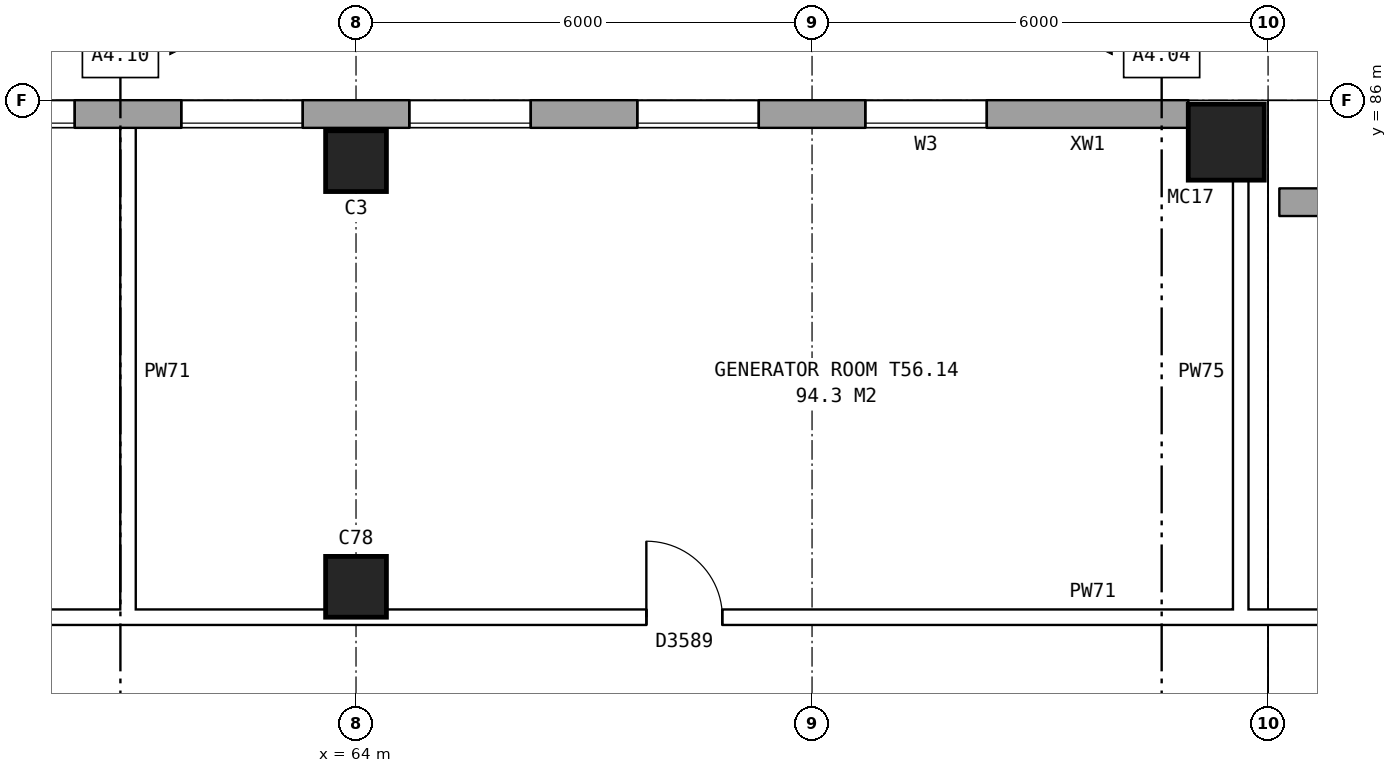
"""IFC4 building model, lengths in metres.
Left out: names, types, materials, properties, quantities, classifications, styles, units other than length and angle.
Written with IfcOpenShell. Run it as: python <this file> out.ifc"""

import sys

from ifc_helpers import new_model, si_unit, direction, frame, frame_2d, origin, origin_2d, place, context, subcontext, project, spatial, rectangle, hollow_rectangle, extrude, element, fill, save


model = new_model("IFC4")
c1 = context("Model", 3, precision=1e-05, world=origin(), true_north=direction((0.0, 1.0)))
c2 = subcontext(c1, "Body", "Model", "MODEL_VIEW")
j1 = project(units=[si_unit("LENGTHUNIT", "METRE"), si_unit("PLANEANGLEUNIT", "RADIAN")], contexts=[c1])
p1 = place(None, origin())
s1 = spatial("IfcSite", under=j1, at=p1, CompositionType="ELEMENT")
p2 = place(p1, origin())
s2 = spatial("IfcBuilding", under=s1, at=p2, CompositionType="ELEMENT")
p3 = place(p2, frame((0.0, 0.0, 198.6)))
s3 = spatial("IfcBuildingStorey", under=s2, at=p3, CompositionType="ELEMENT", Elevation=198.6)
for number, where, z_axis, x_axis in (
    (1, (64.0, 79.6, 0.0), (0.0, 0.0, 1.0), (1.0, 0.0, 0.0)),
    (2, (64.0, 85.2, 0.0), (0.0, 0.0, 1.0), (1.0, 0.0, 0.0)),
):
    element("IfcColumn", number, at=place(p3, frame(where, z_axis=z_axis, x_axis=x_axis)), inside=s3, PredefinedType="COLUMN", context=c2, shape_type="SweptSolid", body=[
        extrude(rectangle(XDim=0.8, YDim=0.8, at=origin_2d()), origin(), (0.0, 0.0, 1.0), 3.7),
    ])
p4 = place(p3, frame((75.45, 85.45, 0.0), z_axis=(0.0, 0.0, 1.0), x_axis=(1.0, 0.0, 0.0)))
e3 = element("IfcColumn", 3, at=p4, inside=s3, PredefinedType="COLUMN", context=c2, shape_type="SweptSolid", body=[
    extrude(hollow_rectangle(XDim=1.0, YDim=1.0, WallThickness=0.055, at=origin_2d()), origin(), (0.0, 0.0, 1.0), 4.2),
])
p5 = place(p3, frame((130.85, 84.66, 0.0), z_axis=(0.0, 0.0, 1.0), x_axis=(-1.0, 0.0, 0.0)))
e4 = element("IfcWall", 4, at=p5, inside=s3, PredefinedType="STANDARD", context=c2, shape_type="SweptSolid", body=[
    extrude(rectangle(XDim=54.7, YDim=0.36, at=frame_2d((27.35, 0.0))), origin(), (0.0, 0.0, 1.0), 3.7),
])
p6 = place(p5, frame((1.75, 0.0, 1.5)))
e5 = element("IfcOpeningElement", 5, at=p6, cuts=e4, PredefinedType="OPENING", context=c2, shape_type="SweptSolid", body=[
    extrude(rectangle(XDim=0.6, YDim=1.2, at=frame_2d((0.3, 0.6))), frame((0.0, 0.19, 0.0), z_axis=(0.0, -1.0, 0.0), x_axis=(1.0, 0.0, 0.0)), (0.0, 0.0, 1.0), 0.38),
])
p7 = place(p5, frame((4.206, 0.0, 1.5)))
e6 = element("IfcOpeningElement", 6, at=p7, cuts=e4, PredefinedType="OPENING", context=c2, shape_type="SweptSolid", body=[
    extrude(rectangle(XDim=1.6, YDim=1.2, at=frame_2d((0.8, 0.6))), frame((0.0, 0.19, 0.0), z_axis=(0.0, -1.0, 0.0), x_axis=(1.0, 0.0, 0.0)), (0.0, 0.0, 1.0), 0.38),
])
p8 = place(p5, frame((2.65, 0.0, 1.5)))
e7 = element("IfcOpeningElement", 7, at=p8, cuts=e4, PredefinedType="OPENING", context=c2, shape_type="SweptSolid", body=[
    extrude(rectangle(XDim=1.2, YDim=1.2, at=frame_2d((0.6, 0.6))), frame((0.0, 0.19, 0.0), z_axis=(0.0, -1.0, 0.0), x_axis=(1.0, 0.0, 0.0)), (0.0, 0.0, 1.0), 0.38),
])
p9 = place(p5, frame((11.081, 0.0, 1.5)))
e8 = element("IfcOpeningElement", 8, at=p9, cuts=e4, PredefinedType="OPENING", context=c2, shape_type="SweptSolid", body=[
    extrude(rectangle(XDim=1.6, YDim=1.2, at=frame_2d((0.8, 0.6))), frame((0.0, 0.19, 0.0), z_axis=(0.0, -1.0, 0.0), x_axis=(1.0, 0.0, 0.0)), (0.0, 0.0, 1.0), 0.38),
])
p10 = place(p5, frame((15.5, 0.0, 1.5)))
e9 = element("IfcOpeningElement", 9, at=p10, cuts=e4, PredefinedType="OPENING", context=c2, shape_type="SweptSolid", body=[
    extrude(rectangle(XDim=1.6, YDim=1.2, at=frame_2d((0.8, 0.6))), frame((0.0, 0.19, 0.0), z_axis=(0.0, -1.0, 0.0), x_axis=(1.0, 0.0, 0.0)), (0.0, 0.0, 1.0), 0.38),
])
p11 = place(p5, frame((17.956, 0.0, 1.5)))
e10 = element("IfcOpeningElement", 10, at=p11, cuts=e4, PredefinedType="OPENING", context=c2, shape_type="SweptSolid", body=[
    extrude(rectangle(XDim=1.6, YDim=1.2, at=frame_2d((0.8, 0.6))), frame((0.0, 0.19, 0.0), z_axis=(0.0, -1.0, 0.0), x_axis=(1.0, 0.0, 0.0)), (0.0, 0.0, 1.0), 0.38),
])
p12 = place(p5, frame((19.9, 0.0, 1.5)))
e11 = element("IfcOpeningElement", 11, at=p12, cuts=e4, PredefinedType="OPENING", context=c2, shape_type="SweptSolid", body=[
    extrude(rectangle(XDim=0.6, YDim=1.2, at=frame_2d((0.3, 0.6))), frame((0.0, 0.19, 0.0), z_axis=(0.0, -1.0, 0.0), x_axis=(1.0, 0.0, 0.0)), (0.0, 0.0, 1.0), 0.38),
])
p13 = place(p5, frame((24.831, 0.0, 1.5)))
e12 = element("IfcOpeningElement", 12, at=p13, cuts=e4, PredefinedType="OPENING", context=c2, shape_type="SweptSolid", body=[
    extrude(rectangle(XDim=1.6, YDim=1.2, at=frame_2d((0.8, 0.6))), frame((0.0, 0.19, 0.0), z_axis=(0.0, -1.0, 0.0), x_axis=(1.0, 0.0, 0.0)), (0.0, 0.0, 1.0), 0.38),
])
p14 = place(p5, frame((28.269, 0.0, 1.5)))
e13 = element("IfcOpeningElement", 13, at=p14, cuts=e4, PredefinedType="OPENING", context=c2, shape_type="SweptSolid", body=[
    extrude(rectangle(XDim=1.6, YDim=1.2, at=frame_2d((0.8, 0.6))), frame((0.0, 0.19, 0.0), z_axis=(0.0, -1.0, 0.0), x_axis=(1.0, 0.0, 0.0)), (0.0, 0.0, 1.0), 0.38),
])
p15 = place(p5, frame((22.35, 0.0, 1.5)))
e14 = element("IfcOpeningElement", 14, at=p15, cuts=e4, PredefinedType="OPENING", context=c2, shape_type="SweptSolid", body=[
    extrude(rectangle(XDim=1.6, YDim=1.2, at=frame_2d((0.8, 0.6))), frame((0.0, 0.19, 0.0), z_axis=(0.0, -1.0, 0.0), x_axis=(1.0, 0.0, 0.0)), (0.0, 0.0, 1.0), 0.38),
])
p16 = place(p5, frame((35.144, 0.0, 1.5)))
e15 = element("IfcOpeningElement", 15, at=p16, cuts=e4, PredefinedType="OPENING", context=c2, shape_type="SweptSolid", body=[
    extrude(rectangle(XDim=1.6, YDim=1.2, at=frame_2d((0.8, 0.6))), frame((0.0, 0.19, 0.0), z_axis=(0.0, -1.0, 0.0), x_axis=(1.0, 0.0, 0.0)), (0.0, 0.0, 1.0), 0.38),
])
p17 = place(p5, frame((37.075, 0.0, 1.5)))
e16 = element("IfcOpeningElement", 16, at=p17, cuts=e4, PredefinedType="OPENING", context=c2, shape_type="SweptSolid", body=[
    extrude(rectangle(XDim=0.6, YDim=1.2, at=frame_2d((0.3, 0.6))), frame((0.0, 0.19, 0.0), z_axis=(0.0, -1.0, 0.0), x_axis=(1.0, 0.0, 0.0)), (0.0, 0.0, 1.0), 0.38),
])
p18 = place(p5, frame((42.019, 0.0, 1.5)))
e17 = element("IfcOpeningElement", 17, at=p18, cuts=e4, PredefinedType="OPENING", context=c2, shape_type="SweptSolid", body=[
    extrude(rectangle(XDim=1.6, YDim=1.2, at=frame_2d((0.8, 0.6))), frame((0.0, 0.19, 0.0), z_axis=(0.0, -1.0, 0.0), x_axis=(1.0, 0.0, 0.0)), (0.0, 0.0, 1.0), 0.38),
])
p19 = place(p5, frame((37.975, 0.0, 1.5)))
e18 = element("IfcOpeningElement", 18, at=p19, cuts=e4, PredefinedType="OPENING", context=c2, shape_type="SweptSolid", body=[
    extrude(rectangle(XDim=1.2, YDim=1.2, at=frame_2d((0.6, 0.6))), frame((0.0, 0.19, 0.0), z_axis=(0.0, -1.0, 0.0), x_axis=(1.0, 0.0, 0.0)), (0.0, 0.0, 1.0), 0.38),
])
p20 = place(p5, frame((48.894, 0.0, 1.5)))
e19 = element("IfcOpeningElement", 19, at=p20, cuts=e4, PredefinedType="OPENING", context=c2, shape_type="SweptSolid", body=[
    extrude(rectangle(XDim=1.6, YDim=1.2, at=frame_2d((0.8, 0.6))), frame((0.0, 0.19, 0.0), z_axis=(0.0, -1.0, 0.0), x_axis=(1.0, 0.0, 0.0)), (0.0, 0.0, 1.0), 0.38),
])
p21 = place(p5, frame((41.075, 0.0, 1.5)))
e20 = element("IfcOpeningElement", 20, at=p21, cuts=e4, PredefinedType="OPENING", context=c2, shape_type="SweptSolid", body=[
    extrude(rectangle(XDim=0.6, YDim=1.2, at=frame_2d((0.3, 0.6))), frame((0.0, 0.19, 0.0), z_axis=(0.0, -1.0, 0.0), x_axis=(1.0, 0.0, 0.0)), (0.0, 0.0, 1.0), 0.38),
])
p22 = place(p5, frame((6.15, 0.0, 1.5)))
e21 = element("IfcOpeningElement", 21, at=p22, cuts=e4, PredefinedType="OPENING", context=c2, shape_type="SweptSolid", body=[
    extrude(rectangle(XDim=0.6, YDim=1.2, at=frame_2d((0.3, 0.6))), frame((0.0, 0.19, 0.0), z_axis=(0.0, -1.0, 0.0), x_axis=(1.0, 0.0, 0.0)), (0.0, 0.0, 1.0), 0.38),
])
p23 = place(p5, frame((8.6, 0.0, 1.5)))
e22 = element("IfcOpeningElement", 22, at=p23, cuts=e4, PredefinedType="OPENING", context=c2, shape_type="SweptSolid", body=[
    extrude(rectangle(XDim=1.6, YDim=1.2, at=frame_2d((0.8, 0.6))), frame((0.0, 0.19, 0.0), z_axis=(0.0, -1.0, 0.0), x_axis=(1.0, 0.0, 0.0)), (0.0, 0.0, 1.0), 0.38),
])
p24 = place(p5, frame((26.75, 0.0, 1.5)))
e23 = element("IfcOpeningElement", 23, at=p24, cuts=e4, PredefinedType="OPENING", context=c2, shape_type="SweptSolid", body=[
    extrude(rectangle(XDim=1.2, YDim=1.2, at=frame_2d((0.6, 0.6))), frame((0.0, 0.19, 0.0), z_axis=(0.0, -1.0, 0.0), x_axis=(1.0, 0.0, 0.0)), (0.0, 0.0, 1.0), 0.38),
])
p25 = place(p5, frame((30.2, 0.0, 1.5)))
e24 = element("IfcOpeningElement", 24, at=p25, cuts=e4, PredefinedType="OPENING", context=c2, shape_type="SweptSolid", body=[
    extrude(rectangle(XDim=1.2, YDim=1.2, at=frame_2d((0.6, 0.6))), frame((0.0, 0.19, 0.0), z_axis=(0.0, -1.0, 0.0), x_axis=(1.0, 0.0, 0.0)), (0.0, 0.0, 1.0), 0.38),
])
p26 = place(p5, frame((43.925, 0.0, 1.5)))
e25 = element("IfcOpeningElement", 25, at=p26, cuts=e4, PredefinedType="OPENING", context=c2, shape_type="SweptSolid", body=[
    extrude(rectangle(XDim=1.6, YDim=1.2, at=frame_2d((0.8, 0.6))), frame((0.0, 0.19, 0.0), z_axis=(0.0, -1.0, 0.0), x_axis=(1.0, 0.0, 0.0)), (0.0, 0.0, 1.0), 0.38),
])
p27 = place(p5, frame((47.925, 0.0, 1.5)))
e26 = element("IfcOpeningElement", 26, at=p27, cuts=e4, PredefinedType="OPENING", context=c2, shape_type="SweptSolid", body=[
    extrude(rectangle(XDim=0.6, YDim=1.2, at=frame_2d((0.3, 0.6))), frame((0.0, 0.19, 0.0), z_axis=(0.0, -1.0, 0.0), x_axis=(1.0, 0.0, 0.0)), (0.0, 0.0, 1.0), 0.38),
])
p28 = place(p5, frame((50.825, 0.0, 1.5)))
e27 = element("IfcOpeningElement", 27, at=p28, cuts=e4, PredefinedType="OPENING", context=c2, shape_type="SweptSolid", body=[
    extrude(rectangle(XDim=1.6, YDim=1.2, at=frame_2d((0.8, 0.6))), frame((0.0, 0.19, 0.0), z_axis=(0.0, -1.0, 0.0), x_axis=(1.0, 0.0, 0.0)), (0.0, 0.0, 1.0), 0.38),
])
p29 = place(p3, frame((74.95, 85.82, 0.0), z_axis=(0.0, 0.0, 1.0), x_axis=(-1.0, 0.0, 0.0)))
e28 = element("IfcWall", 28, at=p29, inside=s3, PredefinedType="STANDARD", context=c2, shape_type="SweptSolid", body=[
    extrude(rectangle(XDim=39.875, YDim=0.36, at=frame_2d((19.938, 0.0))), origin(), (0.0, 0.0, 1.0), 3.7),
])
p30 = place(p29, frame((2.65, 0.0, 1.5)))
e29 = element("IfcOpeningElement", 29, at=p30, cuts=e28, PredefinedType="OPENING", context=c2, shape_type="SweptSolid", body=[
    extrude(rectangle(XDim=1.6, YDim=1.2, at=frame_2d((0.8, 0.6))), frame((0.0, 0.19, 0.0), z_axis=(0.0, -1.0, 0.0), x_axis=(1.0, 0.0, 0.0)), (0.0, 0.0, 1.0), 0.38),
])
p31 = place(p29, frame((5.65, 0.0, 1.5)))
e30 = element("IfcOpeningElement", 30, at=p31, cuts=e28, PredefinedType="OPENING", context=c2, shape_type="SweptSolid", body=[
    extrude(rectangle(XDim=1.6, YDim=1.2, at=frame_2d((0.8, 0.6))), frame((0.0, 0.19, 0.0), z_axis=(0.0, -1.0, 0.0), x_axis=(1.0, 0.0, 0.0)), (0.0, 0.0, 1.0), 0.38),
])
p32 = place(p29, frame((8.65, 0.0, 1.5)))
e31 = element("IfcOpeningElement", 31, at=p32, cuts=e28, PredefinedType="OPENING", context=c2, shape_type="SweptSolid", body=[
    extrude(rectangle(XDim=1.6, YDim=1.2, at=frame_2d((0.8, 0.6))), frame((0.0, 0.19, 0.0), z_axis=(0.0, -1.0, 0.0), x_axis=(1.0, 0.0, 0.0)), (0.0, 0.0, 1.0), 0.38),
])
p33 = place(p29, frame((11.65, 0.0, 1.5)))
e32 = element("IfcOpeningElement", 32, at=p33, cuts=e28, PredefinedType="OPENING", context=c2, shape_type="SweptSolid", body=[
    extrude(rectangle(XDim=1.6, YDim=1.2, at=frame_2d((0.8, 0.6))), frame((0.0, 0.19, 0.0), z_axis=(0.0, -1.0, 0.0), x_axis=(1.0, 0.0, 0.0)), (0.0, 0.0, 1.0), 0.38),
])
p34 = place(p29, frame((14.65, 0.0, 1.5)))
e33 = element("IfcOpeningElement", 33, at=p34, cuts=e28, PredefinedType="OPENING", context=c2, shape_type="SweptSolid", body=[
    extrude(rectangle(XDim=1.6, YDim=1.2, at=frame_2d((0.8, 0.6))), frame((0.0, 0.19, 0.0), z_axis=(0.0, -1.0, 0.0), x_axis=(1.0, 0.0, 0.0)), (0.0, 0.0, 1.0), 0.38),
])
p35 = place(p29, frame((17.65, 0.0, 1.5)))
e34 = element("IfcOpeningElement", 34, at=p35, cuts=e28, PredefinedType="OPENING", context=c2, shape_type="SweptSolid", body=[
    extrude(rectangle(XDim=1.6, YDim=1.2, at=frame_2d((0.8, 0.6))), frame((0.0, 0.19, 0.0), z_axis=(0.0, -1.0, 0.0), x_axis=(1.0, 0.0, 0.0)), (0.0, 0.0, 1.0), 0.38),
])
p36 = place(p29, frame((20.65, 0.0, 1.5)))
e35 = element("IfcOpeningElement", 35, at=p36, cuts=e28, PredefinedType="OPENING", context=c2, shape_type="SweptSolid", body=[
    extrude(rectangle(XDim=1.6, YDim=1.2, at=frame_2d((0.8, 0.6))), frame((0.0, 0.19, 0.0), z_axis=(0.0, -1.0, 0.0), x_axis=(1.0, 0.0, 0.0)), (0.0, 0.0, 1.0), 0.38),
])
p37 = place(p29, frame((23.65, 0.0, 1.5)))
e36 = element("IfcOpeningElement", 36, at=p37, cuts=e28, PredefinedType="OPENING", context=c2, shape_type="SweptSolid", body=[
    extrude(rectangle(XDim=1.6, YDim=1.2, at=frame_2d((0.8, 0.6))), frame((0.0, 0.19, 0.0), z_axis=(0.0, -1.0, 0.0), x_axis=(1.0, 0.0, 0.0)), (0.0, 0.0, 1.0), 0.38),
])
p38 = place(p29, frame((26.65, 0.0, 1.5)))
e37 = element("IfcOpeningElement", 37, at=p38, cuts=e28, PredefinedType="OPENING", context=c2, shape_type="SweptSolid", body=[
    extrude(rectangle(XDim=1.6, YDim=1.2, at=frame_2d((0.8, 0.6))), frame((0.0, 0.19, 0.0), z_axis=(0.0, -1.0, 0.0), x_axis=(1.0, 0.0, 0.0)), (0.0, 0.0, 1.0), 0.38),
])
p39 = place(p29, frame((29.65, 0.0, 1.5)))
e38 = element("IfcOpeningElement", 38, at=p39, cuts=e28, PredefinedType="OPENING", context=c2, shape_type="SweptSolid", body=[
    extrude(rectangle(XDim=1.6, YDim=1.2, at=frame_2d((0.8, 0.6))), frame((0.0, 0.19, 0.0), z_axis=(0.0, -1.0, 0.0), x_axis=(1.0, 0.0, 0.0)), (0.0, 0.0, 1.0), 0.38),
])
p40 = place(p29, frame((32.65, 0.0, 1.5)))
e39 = element("IfcOpeningElement", 39, at=p40, cuts=e28, PredefinedType="OPENING", context=c2, shape_type="SweptSolid", body=[
    extrude(rectangle(XDim=1.6, YDim=1.2, at=frame_2d((0.8, 0.6))), frame((0.0, 0.19, 0.0), z_axis=(0.0, -1.0, 0.0), x_axis=(1.0, 0.0, 0.0)), (0.0, 0.0, 1.0), 0.38),
])
p41 = place(p29, frame((35.65, 0.0, 1.5)))
e40 = element("IfcOpeningElement", 40, at=p41, cuts=e28, PredefinedType="OPENING", context=c2, shape_type="SweptSolid", body=[
    extrude(rectangle(XDim=1.6, YDim=1.2, at=frame_2d((0.8, 0.6))), frame((0.0, 0.19, 0.0), z_axis=(0.0, -1.0, 0.0), x_axis=(1.0, 0.0, 0.0)), (0.0, 0.0, 1.0), 0.38),
])
p42 = place(p3, frame((32.24, 79.2, 0.0), z_axis=(0.0, 0.0, 1.0), x_axis=(1.0, 0.0, 0.0)))
e41 = element("IfcWall", 41, at=p42, inside=s3, PredefinedType="PARTITIONING", context=c2, shape_type="SweptSolid", body=[
    extrude(rectangle(XDim=99.22, YDim=0.2, at=frame_2d((49.61, 0.0))), origin(), (0.0, 0.0, 1.0), 3.7),
])
p43 = place(p42, frame((3.44, 0.0, 0.0)))
e42 = element("IfcOpeningElement", 42, at=p43, cuts=e41, PredefinedType="OPENING", context=c2, shape_type="SweptSolid", body=[
    extrude(rectangle(XDim=1.0, YDim=2.1, at=frame_2d((0.5, 1.05))), frame((0.0, 0.11, 0.0), z_axis=(0.0, -1.0, 0.0), x_axis=(1.0, 0.0, 0.0)), (0.0, 0.0, 1.0), 0.22),
])
p44 = place(p42, frame((11.76, 0.0, 0.0)))
e43 = element("IfcOpeningElement", 43, at=p44, cuts=e41, PredefinedType="OPENING", context=c2, shape_type="SweptSolid", body=[
    extrude(rectangle(XDim=1.0, YDim=2.1, at=frame_2d((0.5, 1.05))), frame((0.0, 0.11, 0.0), z_axis=(0.0, -1.0, 0.0), x_axis=(1.0, 0.0, 0.0)), (0.0, 0.0, 1.0), 0.22),
])
p45 = place(p42, frame((22.26, 0.0, 0.0)))
e44 = element("IfcOpeningElement", 44, at=p45, cuts=e41, PredefinedType="OPENING", context=c2, shape_type="SweptSolid", body=[
    extrude(rectangle(XDim=1.0, YDim=2.1, at=frame_2d((0.5, 1.05))), frame((0.0, 0.11, 0.0), z_axis=(0.0, -1.0, 0.0), x_axis=(1.0, 0.0, 0.0)), (0.0, 0.0, 1.0), 0.22),
])
p46 = place(p42, frame((35.58, 0.0, 0.0)))
e45 = element("IfcOpeningElement", 45, at=p46, cuts=e41, PredefinedType="OPENING", context=c2, shape_type="SweptSolid", body=[
    extrude(rectangle(XDim=1.0, YDim=2.1, at=frame_2d((0.5, 1.05))), frame((0.0, 0.11, 0.0), z_axis=(0.0, -1.0, 0.0), x_axis=(1.0, 0.0, 0.0)), (0.0, 0.0, 1.0), 0.22),
])
p47 = place(p42, frame((53.392, 0.0, 0.0)))
e46 = element("IfcOpeningElement", 46, at=p47, cuts=e41, PredefinedType="OPENING", context=c2, shape_type="SweptSolid", body=[
    extrude(rectangle(XDim=1.0, YDim=2.1, at=frame_2d((0.5, 1.05))), frame((0.0, 0.11, 0.0), z_axis=(0.0, -1.0, 0.0), x_axis=(1.0, 0.0, 0.0)), (0.0, 0.0, 1.0), 0.22),
])
p48 = place(p42, frame((74.198, 0.0, 0.0)))
e47 = element("IfcOpeningElement", 47, at=p48, cuts=e41, PredefinedType="OPENING", context=c2, shape_type="SweptSolid", body=[
    extrude(rectangle(XDim=1.0, YDim=2.1, at=frame_2d((0.5, 1.05))), frame((0.0, 0.11, 0.0), z_axis=(0.0, -1.0, 0.0), x_axis=(1.0, 0.0, 0.0)), (0.0, 0.0, 1.0), 0.22),
])
p49 = place(p42, frame((91.565, 0.0, 0.0)))
e48 = element("IfcOpeningElement", 48, at=p49, cuts=e41, PredefinedType="OPENING", context=c2, shape_type="SweptSolid", body=[
    extrude(rectangle(XDim=1.0, YDim=2.1, at=frame_2d((0.5, 1.05))), frame((0.0, 0.11, 0.0), z_axis=(0.0, -1.0, 0.0), x_axis=(1.0, 0.0, 0.0)), (0.0, 0.0, 1.0), 0.22),
])
for number, where, z_axis, x_axis in (
    (49, (61.0, 79.1, 0.0), (0.0, 0.0, 1.0), (0.0, 1.0, 0.0)),
    (50, (75.64, 79.1, 0.0), (0.0, 0.0, 1.0), (0.0, 1.0, 0.0)),
):
    element("IfcWall", number, at=place(p3, frame(where, z_axis=z_axis, x_axis=x_axis)), inside=s3, PredefinedType="PARTITIONING", context=c2, shape_type="SweptSolid", body=[
        extrude(rectangle(XDim=6.66, YDim=0.2, at=frame_2d((3.33, 0.0))), origin(), (0.0, 0.0, 1.0), 3.7),
    ])
p50 = place(p30, origin())
e51 = element("IfcWindow", 51, at=p50, inside=s3, PartitioningType="DOUBLE_PANEL_HORIZONTAL", PredefinedType="WINDOW", context=c2, shape_type="SweptSolid", body=[
    extrude(rectangle(XDim=1.6, YDim=1.2, at=frame_2d((0.8, 0.6))), frame((0.0, 0.15, 0.0), z_axis=(0.0, -1.0, 0.0), x_axis=(1.0, 0.0, 0.0)), (0.0, 0.0, 1.0), 0.06),
])
fill(e29, e51)
p51 = place(p31, origin())
e52 = element("IfcWindow", 52, at=p51, inside=s3, PartitioningType="DOUBLE_PANEL_HORIZONTAL", PredefinedType="WINDOW", context=c2, shape_type="SweptSolid", body=[
    extrude(rectangle(XDim=1.6, YDim=1.2, at=frame_2d((0.8, 0.6))), frame((0.0, 0.15, 0.0), z_axis=(0.0, -1.0, 0.0), x_axis=(1.0, 0.0, 0.0)), (0.0, 0.0, 1.0), 0.06),
])
fill(e30, e52)
p52 = place(p32, origin())
e53 = element("IfcWindow", 53, at=p52, inside=s3, PartitioningType="DOUBLE_PANEL_HORIZONTAL", PredefinedType="WINDOW", context=c2, shape_type="SweptSolid", body=[
    extrude(rectangle(XDim=1.6, YDim=1.2, at=frame_2d((0.8, 0.6))), frame((0.0, 0.15, 0.0), z_axis=(0.0, -1.0, 0.0), x_axis=(1.0, 0.0, 0.0)), (0.0, 0.0, 1.0), 0.06),
])
fill(e31, e53)
p53 = place(p33, origin())
e54 = element("IfcWindow", 54, at=p53, inside=s3, PartitioningType="DOUBLE_PANEL_HORIZONTAL", PredefinedType="WINDOW", context=c2, shape_type="SweptSolid", body=[
    extrude(rectangle(XDim=1.6, YDim=1.2, at=frame_2d((0.8, 0.6))), frame((0.0, 0.15, 0.0), z_axis=(0.0, -1.0, 0.0), x_axis=(1.0, 0.0, 0.0)), (0.0, 0.0, 1.0), 0.06),
])
fill(e32, e54)
p54 = place(p34, origin())
e55 = element("IfcWindow", 55, at=p54, inside=s3, PartitioningType="DOUBLE_PANEL_HORIZONTAL", PredefinedType="WINDOW", context=c2, shape_type="SweptSolid", body=[
    extrude(rectangle(XDim=1.6, YDim=1.2, at=frame_2d((0.8, 0.6))), frame((0.0, 0.15, 0.0), z_axis=(0.0, -1.0, 0.0), x_axis=(1.0, 0.0, 0.0)), (0.0, 0.0, 1.0), 0.06),
])
fill(e33, e55)
p55 = place(p46, origin())
e56 = element("IfcDoor", 56, at=p55, inside=s3, OperationType="SINGLE_SWING_LEFT", PredefinedType="DOOR", context=c2, shape_type="SweptSolid", body=[
    extrude(rectangle(XDim=1.0, YDim=2.1, at=frame_2d((0.5, 1.05))), frame((0.0, 0.025, 0.0), z_axis=(0.0, -1.0, 0.0), x_axis=(1.0, 0.0, 0.0)), (0.0, 0.0, 1.0), 0.05),
])
fill(e45, e56)
save(model, sys.argv[1])
